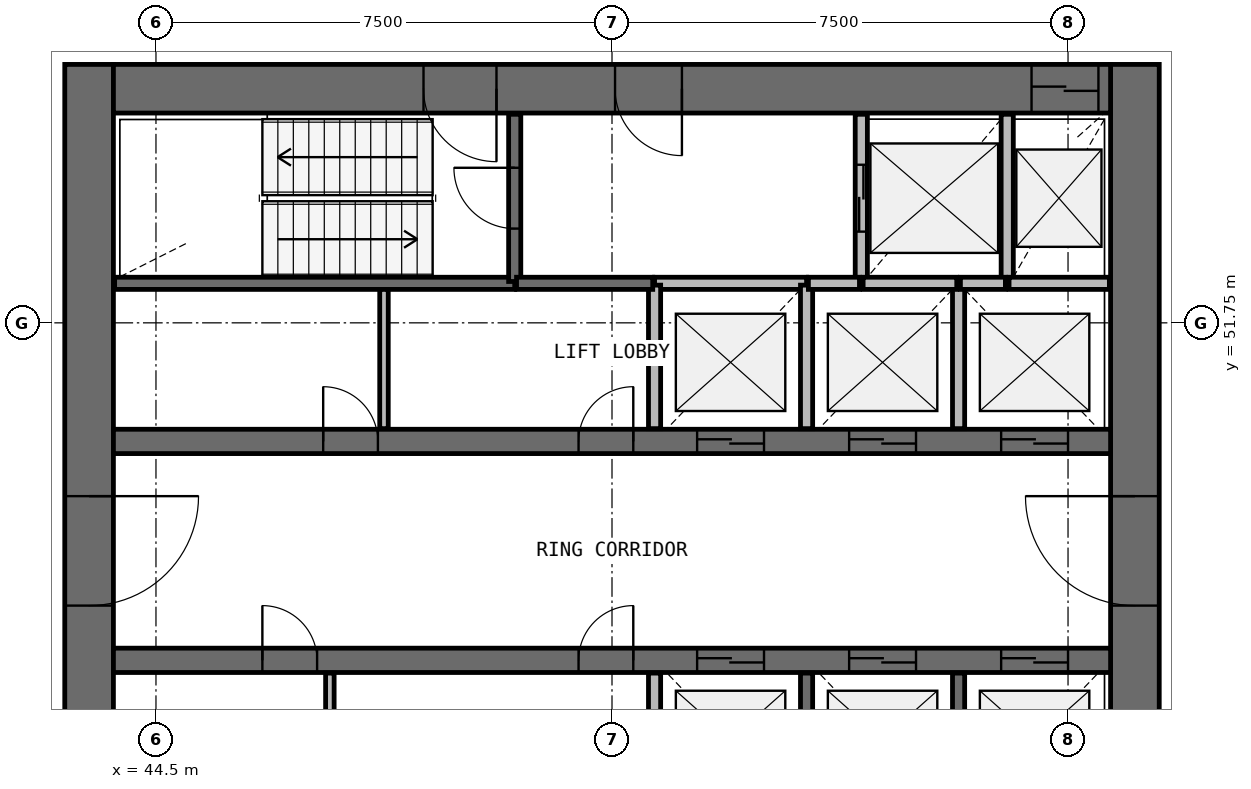
"""IFC4 building model, lengths in metres.
Left out: names, types, materials, properties, quantities, classifications, styles, units other than length and angle.
Written with IfcOpenShell. Run it as: python <this file> out.ifc"""

import sys

from ifc_helpers import new_model, si_unit, direction, frame, frame_2d, origin, place, context, subcontext, project, spatial, rectangle, extrude, source, transform, mapped, element, fill, save


model = new_model("IFC4")
c1 = context("Model", 3, precision=1e-05, world=origin(), true_north=direction((0.0, 1.0)))
c2 = subcontext(c1, "Body", "Model", "MODEL_VIEW")
j1 = project(units=[si_unit("LENGTHUNIT", "METRE"), si_unit("PLANEANGLEUNIT", "RADIAN")], contexts=[c1])
p1 = place(None, origin())
s1 = spatial("IfcSite", under=j1, at=p1, CompositionType="ELEMENT")
p2 = place(p1, origin())
s2 = spatial("IfcBuilding", under=s1, at=p2, CompositionType="ELEMENT")
p3 = place(p2, frame((0.0, 0.0, 176.0)))
s3 = spatial("IfcBuildingStorey", under=s2, at=p3, CompositionType="ELEMENT", Elevation=176.0)
p4 = place(p3, frame((60.6, 40.0, 0.0), z_axis=(0.0, 0.0, 1.0), x_axis=(0.0, 1.0, 0.0)))
e1 = element("IfcWall", 1, at=p4, inside=s3, PredefinedType="SHEAR", context=c2, shape_type="SweptSolid", body=[
    extrude(rectangle(XDim=16.0, YDim=0.8, at=frame_2d((8.0, 0.0))), origin(), (0.0, 0.0, 1.0), 3.9),
])
p5 = place(p4, frame((7.1, 0.0, 0.0)))
e2 = element("IfcOpeningElement", 2, at=p5, cuts=e1, PredefinedType="OPENING", context=c2, shape_type="SweptSolid", body=[
    extrude(rectangle(XDim=1.8, YDim=2.1, at=frame_2d((0.9, 1.05))), frame((0.0, 0.41, 0.0), z_axis=(0.0, -1.0, 0.0), x_axis=(1.0, 0.0, 0.0)), (0.0, 0.0, 1.0), 0.82),
])
p6 = place(p3, frame((43.4, 56.0, 0.0), z_axis=(0.0, 0.0, 1.0), x_axis=(0.0, -1.0, 0.0)))
e3 = element("IfcWall", 3, at=p6, inside=s3, PredefinedType="SHEAR", context=c2, shape_type="SweptSolid", body=[
    extrude(rectangle(XDim=16.0, YDim=0.8, at=frame_2d((8.0, 0.0))), origin(), (0.0, 0.0, 1.0), 3.9),
])
p7 = place(p6, frame((7.1, 0.0, 0.0)))
e4 = element("IfcOpeningElement", 4, at=p7, cuts=e3, PredefinedType="OPENING", context=c2, shape_type="SweptSolid", body=[
    extrude(rectangle(XDim=1.8, YDim=2.1, at=frame_2d((0.9, 1.05))), frame((0.0, 0.41, 0.0), z_axis=(0.0, -1.0, 0.0), x_axis=(1.0, 0.0, 0.0)), (0.0, 0.0, 1.0), 0.82),
])
p8 = place(p3, frame((60.2, 55.6, 0.0), z_axis=(0.0, 0.0, 1.0), x_axis=(-1.0, 0.0, 0.0)))
e5 = element("IfcWall", 5, at=p8, inside=s3, PredefinedType="SHEAR", context=c2, shape_type="SweptSolid", body=[
    extrude(rectangle(XDim=16.4, YDim=0.8, at=frame_2d((8.2, 0.0))), origin(), (0.0, 0.0, 1.0), 3.9),
])
p9 = place(p8, frame((0.2, 0.0, 0.0)))
e6 = element("IfcOpeningElement", 6, at=p9, cuts=e5, PredefinedType="OPENING", context=c2, shape_type="SweptSolid", body=[
    extrude(rectangle(XDim=1.1, YDim=2.1, at=frame_2d((0.55, 1.05))), frame((0.0, 0.41, 0.0), z_axis=(0.0, -1.0, 0.0), x_axis=(1.0, 0.0, 0.0)), (0.0, 0.0, 1.0), 0.82),
])
p10 = place(p8, frame((10.1, 0.0, 0.0)))
e7 = element("IfcOpeningElement", 7, at=p10, cuts=e5, PredefinedType="OPENING", context=c2, shape_type="SweptSolid", body=[
    extrude(rectangle(XDim=1.2, YDim=2.1, at=frame_2d((0.6, 1.05))), frame((0.0, 0.41, 0.0), z_axis=(0.0, -1.0, 0.0), x_axis=(1.0, 0.0, 0.0)), (0.0, 0.0, 1.0), 0.82),
])
p11 = place(p8, frame((7.05, 0.0, 0.0)))
e8 = element("IfcOpeningElement", 8, at=p11, cuts=e5, PredefinedType="OPENING", context=c2, shape_type="SweptSolid", body=[
    extrude(rectangle(XDim=1.1, YDim=2.1, at=frame_2d((0.55, 1.05))), frame((0.0, 0.41, 0.0), z_axis=(0.0, -1.0, 0.0), x_axis=(1.0, 0.0, 0.0)), (0.0, 0.0, 1.0), 0.82),
])
p12 = place(p3, frame((43.8, 49.8, 0.0), z_axis=(0.0, 0.0, 1.0), x_axis=(1.0, 0.0, 0.0)))
e9 = element("IfcWall", 9, at=p12, inside=s3, PredefinedType="SHEAR", context=c2, shape_type="SweptSolid", body=[
    extrude(rectangle(XDim=16.4, YDim=0.4, at=frame_2d((8.2, 0.0))), origin(), (0.0, 0.0, 1.0), 3.9),
])
p13 = place(p12, frame((9.6, 0.0, 0.0)))
e10 = element("IfcOpeningElement", 10, at=p13, cuts=e9, PredefinedType="OPENING", context=c2, shape_type="SweptSolid", body=[
    extrude(rectangle(XDim=1.1, YDim=2.1, at=frame_2d((0.55, 1.05))), frame((0.0, 0.21, 0.0), z_axis=(0.0, -1.0, 0.0), x_axis=(1.0, 0.0, 0.0)), (0.0, 0.0, 1.0), 0.42),
])
p14 = place(p12, frame((12.1, 0.0, 0.0)))
e11 = element("IfcOpeningElement", 11, at=p14, cuts=e9, PredefinedType="OPENING", context=c2, shape_type="SweptSolid", body=[
    extrude(rectangle(XDim=1.1, YDim=2.1, at=frame_2d((0.55, 1.05))), frame((0.0, 0.21, 0.0), z_axis=(0.0, -1.0, 0.0), x_axis=(1.0, 0.0, 0.0)), (0.0, 0.0, 1.0), 0.42),
])
p15 = place(p12, frame((14.6, 0.0, 0.0)))
e12 = element("IfcOpeningElement", 12, at=p15, cuts=e9, PredefinedType="OPENING", context=c2, shape_type="SweptSolid", body=[
    extrude(rectangle(XDim=1.1, YDim=2.1, at=frame_2d((0.55, 1.05))), frame((0.0, 0.21, 0.0), z_axis=(0.0, -1.0, 0.0), x_axis=(1.0, 0.0, 0.0)), (0.0, 0.0, 1.0), 0.42),
])
p16 = place(p12, frame((3.45, 0.0, 0.0)))
e13 = element("IfcOpeningElement", 13, at=p16, cuts=e9, PredefinedType="OPENING", context=c2, shape_type="SweptSolid", body=[
    extrude(rectangle(XDim=0.9, YDim=2.1, at=frame_2d((0.45, 1.05))), frame((0.0, 0.21, 0.0), z_axis=(0.0, -1.0, 0.0), x_axis=(1.0, 0.0, 0.0)), (0.0, 0.0, 1.0), 0.42),
])
p17 = place(p12, frame((7.65, 0.0, 0.0)))
e14 = element("IfcOpeningElement", 14, at=p17, cuts=e9, PredefinedType="OPENING", context=c2, shape_type="SweptSolid", body=[
    extrude(rectangle(XDim=0.9, YDim=2.1, at=frame_2d((0.45, 1.05))), frame((0.0, 0.21, 0.0), z_axis=(0.0, -1.0, 0.0), x_axis=(1.0, 0.0, 0.0)), (0.0, 0.0, 1.0), 0.42),
])
p18 = place(p3, frame((43.8, 46.2, 0.0), z_axis=(0.0, 0.0, 1.0), x_axis=(1.0, 0.0, 0.0)))
e15 = element("IfcWall", 15, at=p18, inside=s3, PredefinedType="SHEAR", context=c2, shape_type="SweptSolid", body=[
    extrude(rectangle(XDim=16.4, YDim=0.4, at=frame_2d((8.2, 0.0))), origin(), (0.0, 0.0, 1.0), 3.9),
])
p19 = place(p18, frame((9.6, 0.0, 0.0)))
e16 = element("IfcOpeningElement", 16, at=p19, cuts=e15, PredefinedType="OPENING", context=c2, shape_type="SweptSolid", body=[
    extrude(rectangle(XDim=1.1, YDim=2.1, at=frame_2d((0.55, 1.05))), frame((0.0, 0.21, 0.0), z_axis=(0.0, -1.0, 0.0), x_axis=(1.0, 0.0, 0.0)), (0.0, 0.0, 1.0), 0.42),
])
p20 = place(p18, frame((12.1, 0.0, 0.0)))
e17 = element("IfcOpeningElement", 17, at=p20, cuts=e15, PredefinedType="OPENING", context=c2, shape_type="SweptSolid", body=[
    extrude(rectangle(XDim=1.1, YDim=2.1, at=frame_2d((0.55, 1.05))), frame((0.0, 0.21, 0.0), z_axis=(0.0, -1.0, 0.0), x_axis=(1.0, 0.0, 0.0)), (0.0, 0.0, 1.0), 0.42),
])
p21 = place(p18, frame((14.6, 0.0, 0.0)))
e18 = element("IfcOpeningElement", 18, at=p21, cuts=e15, PredefinedType="OPENING", context=c2, shape_type="SweptSolid", body=[
    extrude(rectangle(XDim=1.1, YDim=2.1, at=frame_2d((0.55, 1.05))), frame((0.0, 0.21, 0.0), z_axis=(0.0, -1.0, 0.0), x_axis=(1.0, 0.0, 0.0)), (0.0, 0.0, 1.0), 0.42),
])
p22 = place(p18, frame((2.45, 0.0, 0.0)))
e19 = element("IfcOpeningElement", 19, at=p22, cuts=e15, PredefinedType="OPENING", context=c2, shape_type="SweptSolid", body=[
    extrude(rectangle(XDim=0.9, YDim=2.1, at=frame_2d((0.45, 1.05))), frame((0.0, 0.21, 0.0), z_axis=(0.0, -1.0, 0.0), x_axis=(1.0, 0.0, 0.0)), (0.0, 0.0, 1.0), 0.42),
])
p23 = place(p18, frame((7.65, 0.0, 0.0)))
e20 = element("IfcOpeningElement", 20, at=p23, cuts=e15, PredefinedType="OPENING", context=c2, shape_type="SweptSolid", body=[
    extrude(rectangle(XDim=0.9, YDim=2.1, at=frame_2d((0.45, 1.05))), frame((0.0, 0.21, 0.0), z_axis=(0.0, -1.0, 0.0), x_axis=(1.0, 0.0, 0.0)), (0.0, 0.0, 1.0), 0.42),
])
p24 = place(p3, frame((43.82, 52.4, 0.0), z_axis=(0.0, 0.0, 1.0), x_axis=(1.0, 0.0, 0.0)))
e21 = element("IfcWall", 21, at=p24, inside=s3, PredefinedType="SOLIDWALL", context=c2, shape_type="SweptSolid", body=[
    extrude(rectangle(XDim=6.58, YDim=0.2, at=frame_2d((3.29, 0.0))), origin(), (0.0, 0.0, 1.0), 3.4),
])
p25 = place(p3, frame((50.4, 52.43, 0.0), z_axis=(0.0, 0.0, 1.0), x_axis=(0.0, 1.0, 0.0)))
e22 = element("IfcWall", 22, at=p25, inside=s3, PredefinedType="SOLIDWALL", context=c2, shape_type="SweptSolid", body=[
    extrude(rectangle(XDim=2.75, YDim=0.2, at=frame_2d((1.375, 0.0))), origin(), (0.0, 0.0, 1.0), 3.4),
])
p26 = place(p25, frame((0.87, 0.0, 0.0)))
e23 = element("IfcOpeningElement", 23, at=p26, cuts=e22, PredefinedType="OPENING", context=c2, shape_type="SweptSolid", body=[
    extrude(rectangle(XDim=1.0, YDim=2.1, at=frame_2d((0.5, 1.05))), frame((0.0, 0.11, 0.0), z_axis=(0.0, -1.0, 0.0), x_axis=(1.0, 0.0, 0.0)), (0.0, 0.0, 1.0), 0.22),
])
p27 = place(p3, frame((56.1, 55.18, 0.0), z_axis=(0.0, 0.0, 1.0), x_axis=(0.0, -1.0, 0.0)))
e24 = element("IfcWall", 24, at=p27, inside=s3, PredefinedType="SOLIDWALL", context=c2, shape_type="SweptSolid", body=[
    extrude(rectangle(XDim=2.78, YDim=0.2, at=frame_2d((1.39, 0.0))), origin(), (0.0, 0.0, 1.0), 3.4),
])
p28 = place(p27, frame((0.83, 0.0, 0.0)))
e25 = element("IfcOpeningElement", 25, at=p28, cuts=e24, PredefinedType="OPENING", context=c2, shape_type="SweptSolid", body=[
    extrude(rectangle(XDim=1.1, YDim=2.1, at=frame_2d((0.55, 1.05))), frame((0.0, 0.11, 0.0), z_axis=(0.0, -1.0, 0.0), x_axis=(1.0, 0.0, 0.0)), (0.0, 0.0, 1.0), 0.22),
])
p29 = place(p3, frame((58.5, 52.4, 0.0), z_axis=(0.0, 0.0, 1.0), x_axis=(0.0, 1.0, 0.0)))
e26 = element("IfcWall", 26, at=p29, inside=s3, PredefinedType="SOLIDWALL", context=c2, shape_type="SweptSolid", body=[
    extrude(rectangle(XDim=2.78, YDim=0.2, at=frame_2d((1.39, 0.0))), origin(), (0.0, 0.0, 1.0), 3.4),
])
p30 = place(p3, frame((55.2, 52.4, 0.0), z_axis=(0.0, 0.0, 1.0), x_axis=(-1.0, 0.0, 0.0)))
e27 = element("IfcWall", 27, at=p30, inside=s3, PredefinedType="SOLIDWALL", context=c2, shape_type="SweptSolid", body=[
    extrude(rectangle(XDim=2.5, YDim=0.2, at=frame_2d((1.25, 0.0))), origin(), (0.0, 0.0, 1.0), 3.4),
])
for number, where, z_axis, x_axis in (
    (28, (52.7, 45.99, 0.0), (0.0, 0.0, 1.0), (0.0, -1.0, 0.0)),
    (29, (52.7, 52.37, 0.0), (0.0, 0.0, 1.0), (0.0, -1.0, 0.0)),
    (30, (55.2, 43.63, 0.0), (0.0, 0.0, 1.0), (0.0, 1.0, 0.0)),
    (31, (55.2, 50.01, 0.0), (0.0, 0.0, 1.0), (0.0, 1.0, 0.0)),
    (32, (57.7, 43.63, 0.0), (0.0, 0.0, 1.0), (0.0, 1.0, 0.0)),
):
    element("IfcWall", number, at=place(p3, frame(where, z_axis=z_axis, x_axis=x_axis)), inside=s3, PredefinedType="SOLIDWALL", context=c2, shape_type="SweptSolid", body=[
        extrude(rectangle(XDim=2.36, YDim=0.2, at=frame_2d((1.18, 0.0))), origin(), (0.0, 0.0, 1.0), 3.4),
    ])
p31 = place(p3, frame((57.7, 50.01, 0.0), z_axis=(0.0, 0.0, 1.0), x_axis=(0.0, 1.0, 0.0)))
e33 = element("IfcWall", 33, at=p31, inside=s3, PredefinedType="SOLIDWALL", context=c2, shape_type="SweptSolid", body=[
    extrude(rectangle(XDim=2.39, YDim=0.2, at=frame_2d((1.195, 0.0))), origin(), (0.0, 0.0, 1.0), 3.4),
])
p32 = place(p3, frame((50.43, 52.4, 0.0), z_axis=(0.0, 0.0, 1.0), x_axis=(1.0, 0.0, 0.0)))
e34 = element("IfcWall", 34, at=p32, inside=s3, PredefinedType="SOLIDWALL", context=c2, shape_type="SweptSolid", body=[
    extrude(rectangle(XDim=2.24, YDim=0.2, at=frame_2d((1.12, 0.0))), origin(), (0.0, 0.0, 1.0), 3.4),
])
p33 = place(p3, frame((60.18, 52.4, 0.0), z_axis=(0.0, 0.0, 1.0), x_axis=(-1.0, 0.0, 0.0)))
e35 = element("IfcWall", 35, at=p33, inside=s3, PredefinedType="SOLIDWALL", context=c2, shape_type="SweptSolid", body=[
    extrude(rectangle(XDim=1.65, YDim=0.2, at=frame_2d((0.825, 0.0))), origin(), (0.0, 0.0, 1.0), 3.4),
])
p34 = place(p3, frame((57.67, 52.4, 0.0), z_axis=(0.0, 0.0, 1.0), x_axis=(-1.0, 0.0, 0.0)))
e36 = element("IfcWall", 36, at=p34, inside=s3, PredefinedType="SOLIDWALL", context=c2, shape_type="SweptSolid", body=[
    extrude(rectangle(XDim=1.54, YDim=0.2, at=frame_2d((0.77, 0.0))), origin(), (0.0, 0.0, 1.0), 3.4),
])
p35 = place(p3, frame((56.07, 52.4, 0.0), z_axis=(0.0, 0.0, 1.0), x_axis=(-1.0, 0.0, 0.0)))
e37 = element("IfcWall", 37, at=p35, inside=s3, PredefinedType="SOLIDWALL", context=c2, shape_type="SweptSolid", body=[
    extrude(rectangle(XDim=0.84, YDim=0.2, at=frame_2d((0.42, 0.0))), origin(), (0.0, 0.0, 1.0), 3.4),
])
p36 = place(p3, frame((58.47, 52.4, 0.0), z_axis=(0.0, 0.0, 1.0), x_axis=(-1.0, 0.0, 0.0)))
e38 = element("IfcWall", 38, at=p36, inside=s3, PredefinedType="SOLIDWALL", context=c2, shape_type="SweptSolid", body=[
    extrude(rectangle(XDim=0.74, YDim=0.2, at=frame_2d((0.37, 0.0))), origin(), (0.0, 0.0, 1.0), 3.4),
])
for number, where, z_axis, x_axis in (
    (39, (47.36, 43.7, 0.0), (0.0, 0.0, 1.0), (0.0, 1.0, 0.0)),
    (40, (48.25, 50.01, 0.0), (0.0, 0.0, 1.0), (0.0, 1.0, 0.0)),
):
    element("IfcWall", number, at=place(p3, frame(where, z_axis=z_axis, x_axis=x_axis)), inside=s3, PredefinedType="PARTITIONING", context=c2, shape_type="SweptSolid", body=[
        extrude(rectangle(XDim=2.29, YDim=0.14, at=frame_2d((1.145, 0.0))), origin(), (0.0, 0.0, 1.0), 2.7),
    ])
m1 = source(origin(), c2, "Body", "SweptSolid", [
    extrude(rectangle(XDim=1.8, YDim=2.1, at=frame_2d((0.9, 1.05))), frame((0.0, 0.025, 0.0), z_axis=(0.0, -1.0, 0.0), x_axis=(1.0, 0.0, 0.0)), (0.0, 0.0, 1.0), 0.05),
])
p37 = place(p7, origin())
e41 = element("IfcDoor", 41, at=p37, inside=s3, OperationType="SINGLE_SWING_LEFT", PredefinedType="DOOR", context=c2, shape_type="MappedRepresentation", body=[
    mapped(m1, transform((0.0, 0.0, 0.0), scale=1.0)),
])
fill(e4, e41)
p38 = place(p5, origin())
e42 = element("IfcDoor", 42, at=p38, inside=s3, OperationType="SINGLE_SWING_RIGHT", PredefinedType="DOOR", context=c2, shape_type="MappedRepresentation", body=[
    mapped(m1, transform((0.0, 0.0, 0.0), scale=1.0)),
])
fill(e2, e42)
m2 = source(origin(), c2, "Body", "SweptSolid", [
    extrude(rectangle(XDim=1.1, YDim=2.1, at=frame_2d((0.55, 1.05))), frame((0.0, 0.025, 0.0), z_axis=(0.0, -1.0, 0.0), x_axis=(1.0, 0.0, 0.0)), (0.0, 0.0, 1.0), 0.05),
])
p39 = place(p13, origin())
e43 = element("IfcDoor", 43, at=p39, inside=s3, OperationType="DOUBLE_DOOR_SLIDING", PredefinedType="USERDEFINED", context=c2, shape_type="MappedRepresentation", body=[
    mapped(m2, transform((0.0, 0.0, 0.0), scale=1.0)),
])
fill(e10, e43)
p40 = place(p14, origin())
e44 = element("IfcDoor", 44, at=p40, inside=s3, OperationType="DOUBLE_DOOR_SLIDING", PredefinedType="USERDEFINED", context=c2, shape_type="MappedRepresentation", body=[
    mapped(m2, transform((0.0, 0.0, 0.0), scale=1.0)),
])
fill(e11, e44)
p41 = place(p15, origin())
e45 = element("IfcDoor", 45, at=p41, inside=s3, OperationType="DOUBLE_DOOR_SLIDING", PredefinedType="USERDEFINED", context=c2, shape_type="MappedRepresentation", body=[
    mapped(m2, transform((0.0, 0.0, 0.0), scale=1.0)),
])
fill(e12, e45)
p42 = place(p19, origin())
e46 = element("IfcDoor", 46, at=p42, inside=s3, OperationType="DOUBLE_DOOR_SLIDING", PredefinedType="USERDEFINED", context=c2, shape_type="MappedRepresentation", body=[
    mapped(m2, transform((0.0, 0.0, 0.0), scale=1.0)),
])
fill(e16, e46)
p43 = place(p20, origin())
e47 = element("IfcDoor", 47, at=p43, inside=s3, OperationType="DOUBLE_DOOR_SLIDING", PredefinedType="USERDEFINED", context=c2, shape_type="MappedRepresentation", body=[
    mapped(m2, transform((0.0, 0.0, 0.0), scale=1.0)),
])
fill(e17, e47)
p44 = place(p21, origin())
e48 = element("IfcDoor", 48, at=p44, inside=s3, OperationType="DOUBLE_DOOR_SLIDING", PredefinedType="USERDEFINED", context=c2, shape_type="MappedRepresentation", body=[
    mapped(m2, transform((0.0, 0.0, 0.0), scale=1.0)),
])
fill(e18, e48)
p45 = place(p28, origin())
e49 = element("IfcDoor", 49, at=p45, inside=s3, OperationType="DOUBLE_DOOR_SLIDING", PredefinedType="USERDEFINED", context=c2, shape_type="MappedRepresentation", body=[
    mapped(m2, transform((0.0, 0.0, 0.0), scale=1.0)),
])
fill(e25, e49)
p46 = place(p9, origin())
e50 = element("IfcDoor", 50, at=p46, inside=s3, OperationType="DOUBLE_DOOR_SLIDING", PredefinedType="USERDEFINED", context=c2, shape_type="MappedRepresentation", body=[
    mapped(m2, transform((0.0, 0.0, 0.0), scale=1.0)),
])
fill(e6, e50)
m3 = source(origin(), c2, "Body", "SweptSolid", [
    extrude(rectangle(XDim=1.2, YDim=2.1, at=frame_2d((0.6, 1.05))), frame((0.0, 0.025, 0.0), z_axis=(0.0, -1.0, 0.0), x_axis=(1.0, 0.0, 0.0)), (0.0, 0.0, 1.0), 0.05),
])
p47 = place(p10, origin())
e51 = element("IfcDoor", 51, at=p47, inside=s3, OperationType="SINGLE_SWING_LEFT", PredefinedType="DOOR", context=c2, shape_type="MappedRepresentation", body=[
    mapped(m3, transform((0.0, 0.0, 0.0), scale=1.0)),
])
fill(e7, e51)
m4 = source(origin(), c2, "Body", "SweptSolid", [
    extrude(rectangle(XDim=1.0, YDim=2.1, at=frame_2d((0.5, 1.05))), frame((0.0, 0.025, 0.0), z_axis=(0.0, -1.0, 0.0), x_axis=(1.0, 0.0, 0.0)), (0.0, 0.0, 1.0), 0.05),
])
p48 = place(p26, origin())
e52 = element("IfcDoor", 52, at=p48, inside=s3, OperationType="SINGLE_SWING_RIGHT", PredefinedType="DOOR", context=c2, shape_type="MappedRepresentation", body=[
    mapped(m4, transform((0.0, 0.0, 0.0), scale=1.0)),
])
fill(e23, e52)
m5 = source(origin(), c2, "Body", "SweptSolid", [
    extrude(rectangle(XDim=1.1, YDim=2.1, at=frame_2d((0.55, 1.05))), frame((0.0, 0.025, 0.0), z_axis=(0.0, -1.0, 0.0), x_axis=(1.0, 0.0, 0.0)), (0.0, 0.0, 1.0), 0.05),
])
p49 = place(p11, origin())
e53 = element("IfcDoor", 53, at=p49, inside=s3, OperationType="SINGLE_SWING_LEFT", PredefinedType="DOOR", context=c2, shape_type="MappedRepresentation", body=[
    mapped(m5, transform((0.0, 0.0, 0.0), scale=1.0)),
])
fill(e8, e53)
m6 = source(origin(), c2, "Body", "SweptSolid", [
    extrude(rectangle(XDim=0.9, YDim=2.1, at=frame_2d((0.45, 1.05))), frame((0.0, 0.025, 0.0), z_axis=(0.0, -1.0, 0.0), x_axis=(1.0, 0.0, 0.0)), (0.0, 0.0, 1.0), 0.05),
])
p50 = place(p16, origin())
e54 = element("IfcDoor", 54, at=p50, inside=s3, OperationType="SINGLE_SWING_LEFT", PredefinedType="DOOR", context=c2, shape_type="MappedRepresentation", body=[
    mapped(m6, transform((0.0, 0.0, 0.0), scale=1.0)),
])
fill(e13, e54)
p51 = place(p17, origin())
e55 = element("IfcDoor", 55, at=p51, inside=s3, OperationType="SINGLE_SWING_RIGHT", PredefinedType="DOOR", context=c2, shape_type="MappedRepresentation", body=[
    mapped(m6, transform((0.0, 0.0, 0.0), scale=1.0)),
])
fill(e14, e55)
p52 = place(p22, origin())
e56 = element("IfcDoor", 56, at=p52, inside=s3, OperationType="SINGLE_SWING_LEFT", PredefinedType="DOOR", context=c2, shape_type="MappedRepresentation", body=[
    mapped(m6, transform((0.0, 0.0, 0.0), scale=1.0)),
])
fill(e19, e56)
p53 = place(p23, origin())
e57 = element("IfcDoor", 57, at=p53, inside=s3, OperationType="SINGLE_SWING_RIGHT", PredefinedType="DOOR", context=c2, shape_type="MappedRepresentation", body=[
    mapped(m6, transform((0.0, 0.0, 0.0), scale=1.0)),
])
fill(e20, e57)
save(model, sys.argv[1])
